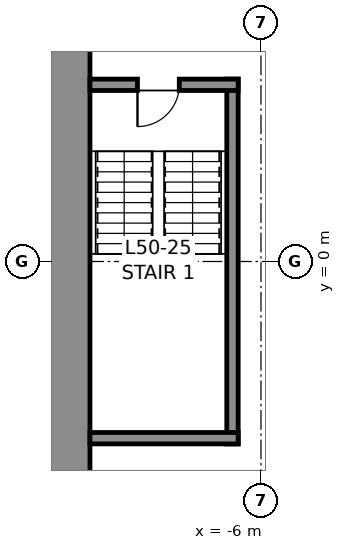
"""IFC4 building model, lengths in metres.
Left out: names, types, materials, properties, quantities, classifications, styles, units other than length and angle.
Written with IfcOpenShell. Run it as: python <this file> out.ifc"""

import sys

from ifc_helpers import new_model, si_unit, direction, frame, frame_2d, origin, place, context, subcontext, project, spatial, rectangle, extrude, element, fill, save


model = new_model("IFC4")
c1 = context("Model", 3, precision=1e-05, world=origin(), true_north=direction((0.0, 1.0)))
c2 = subcontext(c1, "Body", "Model", "MODEL_VIEW")
j1 = project(units=[si_unit("LENGTHUNIT", "METRE"), si_unit("PLANEANGLEUNIT", "RADIAN")], contexts=[c1])
p1 = place(None, origin())
s1 = spatial("IfcSite", under=j1, at=p1, CompositionType="ELEMENT")
p2 = place(p1, origin())
s2 = spatial("IfcBuilding", under=s1, at=p2, CompositionType="ELEMENT")
p3 = place(p2, frame((0.0, 0.0, 229.8)))
s3 = spatial("IfcBuildingStorey", under=s2, at=p3, CompositionType="ELEMENT", Elevation=229.8)
p4 = place(p3, frame((-11.25, -10.5, 0.0), z_axis=(0.0, 0.0, 1.0), x_axis=(0.0, 1.0, 0.0)))
e1 = element("IfcWall", 1, at=p4, inside=s3, PredefinedType="SHEAR", context=c2, shape_type="SweptSolid", body=[
    extrude(rectangle(XDim=21.0, YDim=1.5, at=frame_2d((10.5, 0.0))), origin(), (0.0, 0.0, 1.0), 4.0),
])
p5 = place(p4, frame((16.1, 0.0, 0.0)))
e2 = element("IfcOpeningElement", 2, at=p5, cuts=e1, PredefinedType="OPENING", context=c2, shape_type="SweptSolid", body=[
    extrude(rectangle(XDim=1.2, YDim=2.3, at=frame_2d((0.6, 1.15))), frame((0.0, 0.76, 0.0), z_axis=(0.0, -1.0, 0.0), x_axis=(1.0, 0.0, 0.0)), (0.0, 0.0, 1.0), 1.52),
])
p6 = place(p4, frame((3.7, 0.0, 0.0)))
e3 = element("IfcOpeningElement", 3, at=p6, cuts=e1, PredefinedType="OPENING", context=c2, shape_type="SweptSolid", body=[
    extrude(rectangle(XDim=1.2, YDim=2.3, at=frame_2d((0.6, 1.15))), frame((0.0, 0.76, 0.0), z_axis=(0.0, -1.0, 0.0), x_axis=(1.0, 0.0, 0.0)), (0.0, 0.0, 1.0), 1.52),
])
p7 = place(p3, frame((-6.75, -4.8, 0.0), z_axis=(0.0, 0.0, 1.0), x_axis=(0.0, 1.0, 0.0)))
e4 = element("IfcWall", 4, at=p7, inside=s3, PredefinedType="SOLIDWALL", context=c2, shape_type="SweptSolid", body=[
    extrude(rectangle(XDim=9.6, YDim=0.3, at=frame_2d((4.8, 0.0))), origin(), (0.0, 0.0, 1.0), 3.75),
])
p8 = place(p3, frame((-10.5, 4.65, 0.0), z_axis=(0.0, 0.0, 1.0), x_axis=(1.0, 0.0, 0.0)))
e5 = element("IfcWall", 5, at=p8, inside=s3, PredefinedType="SOLIDWALL", context=c2, shape_type="SweptSolid", body=[
    extrude(rectangle(XDim=3.9, YDim=0.3, at=frame_2d((1.95, 0.0))), origin(), (0.0, 0.0, 1.0), 3.75),
])
p9 = place(p8, frame((1.25, 0.0, 0.0)))
e6 = element("IfcOpeningElement", 6, at=p9, cuts=e5, PredefinedType="OPENING", context=c2, shape_type="SweptSolid", body=[
    extrude(rectangle(XDim=1.1, YDim=2.3, at=frame_2d((0.55, 1.15))), frame((0.0, 0.16, 0.0), z_axis=(0.0, -1.0, 0.0), x_axis=(1.0, 0.0, 0.0)), (0.0, 0.0, 1.0), 0.32),
])
p10 = place(p3, frame((-6.6, -4.65, 0.0), z_axis=(0.0, 0.0, 1.0), x_axis=(-1.0, 0.0, 0.0)))
e7 = element("IfcWall", 7, at=p10, inside=s3, PredefinedType="SOLIDWALL", context=c2, shape_type="SweptSolid", body=[
    extrude(rectangle(XDim=3.9, YDim=0.3, at=frame_2d((1.95, 0.0))), origin(), (0.0, 0.0, 1.0), 3.75),
])
p11 = place(p9, frame((1.1, 0.0, 0.0), z_axis=(0.0, 0.0, 1.0), x_axis=(-1.0, 0.0, 0.0)))
e8 = element("IfcDoor", 8, at=p11, inside=s3, OperationType="SINGLE_SWING_RIGHT", PredefinedType="DOOR", context=c2, shape_type="SweptSolid", body=[
    extrude(rectangle(XDim=1.1, YDim=2.3, at=frame_2d((0.55, 1.15))), frame((0.0, 0.025, 0.0), z_axis=(0.0, -1.0, 0.0), x_axis=(1.0, 0.0, 0.0)), (0.0, 0.0, 1.0), 0.05),
])
fill(e6, e8)
save(model, sys.argv[1])
